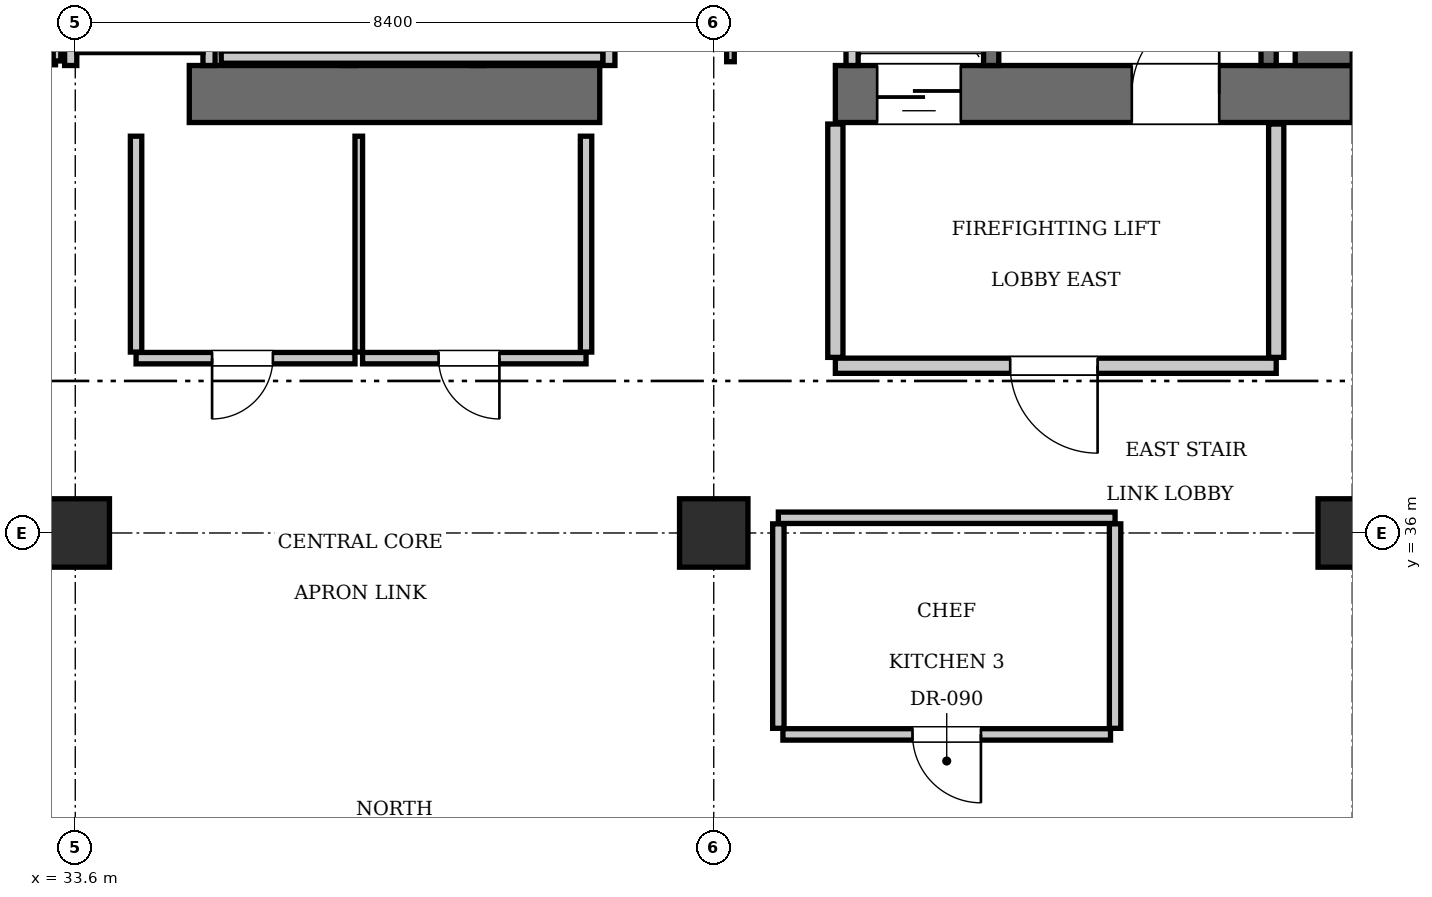
"""IFC4 building model, lengths in metres.
Left out: names, types, materials, properties, quantities, classifications, styles, units other than length and angle.
Written with IfcOpenShell. Run it as: python <this file> out.ifc"""

import sys

from ifc_helpers import new_model, si_unit, direction, frame, frame_2d, origin, origin_2d, place, context, subcontext, project, spatial, rectangle, extrude, element, fill, save


model = new_model("IFC4")
c1 = context("Model", 3, precision=1e-05, world=origin(), true_north=direction((0.0, 1.0)))
c2 = subcontext(c1, "Body", "Model", "MODEL_VIEW")
j1 = project(units=[si_unit("LENGTHUNIT", "METRE"), si_unit("PLANEANGLEUNIT", "RADIAN")], contexts=[c1])
p1 = place(None, origin())
s1 = spatial("IfcSite", under=j1, at=p1, CompositionType="ELEMENT")
p2 = place(p1, origin())
s2 = spatial("IfcBuilding", under=s1, at=p2, CompositionType="ELEMENT")
p3 = place(p2, frame((0.0, 0.0, 169.75)))
s3 = spatial("IfcBuildingStorey", under=s2, at=p3, CompositionType="ELEMENT", Elevation=169.75)
p4 = place(p3, frame((35.1, 41.775, 0.0), z_axis=(0.0, 0.0, 1.0), x_axis=(1.0, 0.0, 0.0)))
e1 = element("IfcWall", 1, at=p4, inside=s3, PredefinedType="SHEAR", context=c2, shape_type="SweptSolid", body=[
    extrude(rectangle(XDim=5.4, YDim=0.75, at=frame_2d((2.7, 0.0))), origin(), (0.0, 0.0, 1.0), 3.85),
])
p5 = place(p3, frame((43.6, 41.775, 0.0), z_axis=(0.0, 0.0, 1.0), x_axis=(1.0, 0.0, 0.0)))
e2 = element("IfcWall", 2, at=p5, inside=s3, PredefinedType="SHEAR", context=c2, shape_type="SweptSolid", body=[
    extrude(rectangle(XDim=6.8, YDim=0.75, at=frame_2d((3.4, 0.0))), origin(), (0.0, 0.0, 1.0), 3.85),
])
p6 = place(p5, frame((3.9, 0.0, 0.0)))
e3 = element("IfcOpeningElement", 3, at=p6, cuts=e2, PredefinedType="OPENING", context=c2, shape_type="SweptSolid", body=[
    extrude(rectangle(XDim=1.15, YDim=2.15, at=frame_2d((0.575, 1.075))), frame((0.0, 0.385, 0.0), z_axis=(0.0, -1.0, 0.0), x_axis=(1.0, 0.0, 0.0)), (0.0, 0.0, 1.0), 0.77),
])
p7 = place(p5, frame((0.55, 0.0, 0.0)))
e4 = element("IfcOpeningElement", 4, at=p7, cuts=e2, PredefinedType="OPENING", context=c2, shape_type="SweptSolid", body=[
    extrude(rectangle(XDim=1.1, YDim=2.2, at=frame_2d((0.55, 1.1))), frame((0.0, 0.385, 0.0), z_axis=(0.0, -1.0, 0.0), x_axis=(1.0, 0.0, 0.0)), (0.0, 0.0, 1.0), 0.77),
])
p8 = place(p3, frame((50.025, 42.15, 0.0), z_axis=(0.0, 0.0, 1.0), x_axis=(0.0, 1.0, 0.0)))
e5 = element("IfcWall", 5, at=p8, inside=s3, PredefinedType="SHEAR", context=c2, shape_type="SweptSolid", body=[
    extrude(rectangle(XDim=1.9, YDim=0.75, at=frame_2d((0.95, 0.0))), origin(), (0.0, 0.0, 1.0), 3.85),
])
for number, where, z_axis, x_axis in (
    (6, (33.6, 36.0, 0.0), (0.0, 0.0, 1.0), (1.0, 0.0, 0.0)),
    (7, (42.0, 36.0, 0.0), (0.0, 0.0, 1.0), (1.0, 0.0, 0.0)),
    (8, (50.4, 36.0, 0.0), (0.0, 0.0, 1.0), (1.0, 0.0, 0.0)),
):
    element("IfcColumn", number, at=place(p3, frame(where, z_axis=z_axis, x_axis=x_axis)), inside=s3, PredefinedType="COLUMN", context=c2, shape_type="SweptSolid", body=[
        extrude(rectangle(XDim=0.9, YDim=0.9, at=origin_2d()), origin(), (0.0, 0.0, 1.0), 3.85),
    ])
p9 = place(p3, frame((45.65, 42.15, 0.0), z_axis=(0.0, 0.0, 1.0), x_axis=(0.0, 1.0, 0.0)))
e9 = element("IfcWall", 9, at=p9, inside=s3, PredefinedType="SOLIDWALL", context=c2, shape_type="SweptSolid", body=[
    extrude(rectangle(XDim=9.0, YDim=0.2, at=frame_2d((4.5, 0.0))), origin(), (0.0, 0.0, 1.0), 3.61),
])
p10 = place(p3, frame((49.3, 42.15, 0.0), z_axis=(0.0, 0.0, 1.0), x_axis=(0.0, 1.0, 0.0)))
e10 = element("IfcWall", 10, at=p10, inside=s3, PredefinedType="SOLIDWALL", context=c2, shape_type="SweptSolid", body=[
    extrude(rectangle(XDim=1.87, YDim=0.2, at=frame_2d((0.935, 0.0))), origin(), (0.0, 0.0, 1.0), 3.61),
])
p11 = place(p3, frame((43.82, 42.15, 0.0), z_axis=(0.0, 0.0, 1.0), x_axis=(0.0, 1.0, 0.0)))
e11 = element("IfcWall", 11, at=p11, inside=s3, PredefinedType="SOLIDWALL", context=c2, shape_type="SweptSolid", body=[
    extrude(rectangle(XDim=2.59, YDim=0.16, at=frame_2d((1.295, 0.0))), origin(), (0.0, 0.0, 1.0), 3.61),
])
for number, where, z_axis, x_axis in (
    (12, (37.2, 42.15, 0.0), (0.0, 0.0, 1.0), (0.0, 1.0, 0.0)),
    (13, (38.9, 42.15, 0.0), (0.0, 0.0, 1.0), (0.0, 1.0, 0.0)),
    (14, (40.62, 42.15, 0.0), (0.0, 0.0, 1.0), (0.0, 1.0, 0.0)),
):
    element("IfcWall", number, at=place(p3, frame(where, z_axis=z_axis, x_axis=x_axis)), inside=s3, PredefinedType="SOLIDWALL", context=c2, shape_type="SweptSolid", body=[
        extrude(rectangle(XDim=2.2, YDim=0.16, at=frame_2d((1.1, 0.0))), origin(), (0.0, 0.0, 1.0), 3.61),
    ])
p12 = place(p3, frame((35.52, 42.26, 0.0), z_axis=(0.0, 0.0, 1.0), x_axis=(1.0, 0.0, 0.0)))
e15 = element("IfcWall", 15, at=p12, inside=s3, PredefinedType="SOLIDWALL", context=c2, shape_type="SweptSolid", body=[
    extrude(rectangle(XDim=5.02, YDim=0.16, at=frame_2d((2.51, 0.0))), origin(), (0.0, 0.0, 1.0), 3.61),
])
for number, where, z_axis, x_axis in (
    (16, (33.54, 42.15, 0.0), (0.0, 0.0, 1.0), (0.0, 1.0, 0.0)),
    (17, (35.36, 42.15, 0.0), (0.0, 0.0, 1.0), (0.0, 1.0, 0.0)),
):
    element("IfcWall", number, at=place(p3, frame(where, z_axis=z_axis, x_axis=x_axis)), inside=s3, PredefinedType="SOLIDWALL", context=c2, shape_type="SweptSolid", body=[
        extrude(rectangle(XDim=2.25, YDim=0.16, at=frame_2d((1.125, 0.0))), origin(), (0.0, 0.0, 1.0), 3.61),
    ])
p13 = place(p3, frame((33.62, 42.4, 0.0), z_axis=(0.0, 0.0, 1.0), x_axis=(1.0, 0.0, 0.0)))
e18 = element("IfcWall", 18, at=p13, inside=s3, PredefinedType="SOLIDWALL", context=c2, shape_type="SweptSolid", body=[
    extrude(rectangle(XDim=1.66, YDim=0.16, at=frame_2d((0.83, 0.0))), origin(), (0.0, 0.0, 1.0), 3.61),
])
p14 = place(p3, frame((43.6, 38.2, 0.0), z_axis=(0.0, 0.0, 1.0), x_axis=(1.0, 0.0, 0.0)))
e19 = element("IfcWall", 19, at=p14, inside=s3, PredefinedType="PARTITIONING", context=c2, shape_type="SweptSolid", body=[
    extrude(rectangle(XDim=5.8, YDim=0.2, at=frame_2d((2.9, 0.0))), origin(), (0.0, 0.0, 1.0), 3.61),
])
p15 = place(p14, frame((2.3, 0.0, 0.0)))
e20 = element("IfcOpeningElement", 20, at=p15, cuts=e19, PredefinedType="OPENING", context=c2, shape_type="SweptSolid", body=[
    extrude(rectangle(XDim=1.15, YDim=2.15, at=frame_2d((0.575, 1.075))), frame((0.0, 0.11, 0.0), z_axis=(0.0, -1.0, 0.0), x_axis=(1.0, 0.0, 0.0)), (0.0, 0.0, 1.0), 0.22),
])
for number, where, z_axis, x_axis in (
    (21, (43.6, 38.31, 0.0), (0.0, 0.0, 1.0), (0.0, 1.0, 0.0)),
    (22, (49.4, 38.31, 0.0), (0.0, 0.0, 1.0), (0.0, 1.0, 0.0)),
):
    element("IfcWall", number, at=place(p3, frame(where, z_axis=z_axis, x_axis=x_axis)), inside=s3, PredefinedType="PARTITIONING", context=c2, shape_type="SweptSolid", body=[
        extrude(rectangle(XDim=3.07, YDim=0.2, at=frame_2d((1.535, 0.0))), origin(), (0.0, 0.0, 1.0), 3.61),
    ])
p16 = place(p3, frame((32.02, 42.21, 0.0), z_axis=(0.0, 0.0, 1.0), x_axis=(1.0, 0.0, 0.0)))
e23 = element("IfcWall", 23, at=p16, inside=s3, PredefinedType="PARTITIONING", context=c2, shape_type="SweptSolid", body=[
    extrude(rectangle(XDim=1.32, YDim=0.1, at=frame_2d((0.66, 0.0))), origin(), (0.0, 0.0, 1.0), 3.61),
])
p17 = place(p16, frame((0.24, 0.0, 0.0)))
e24 = element("IfcOpeningElement", 24, at=p17, cuts=e23, PredefinedType="OPENING", context=c2, shape_type="SweptSolid", body=[
    extrude(rectangle(XDim=0.8, YDim=2.05, at=frame_2d((0.4, 1.025))), frame((0.0, 0.06, 0.0), z_axis=(0.0, -1.0, 0.0), x_axis=(1.0, 0.0, 0.0)), (0.0, 0.0, 1.0), 0.12),
])
p18 = place(p3, frame((33.36, 42.21, 0.0), z_axis=(0.0, 0.0, 1.0), x_axis=(0.0, 1.0, 0.0)))
e25 = element("IfcWall", 25, at=p18, inside=s3, PredefinedType="PARTITIONING", context=c2, shape_type="SweptSolid", body=[
    extrude(rectangle(XDim=2.73, YDim=0.1, at=frame_2d((1.365, 0.0))), origin(), (0.0, 0.0, 1.0), 3.61),
])
p19 = place(p3, frame((42.22, 42.2, 0.0), z_axis=(0.0, 0.0, 1.0), x_axis=(0.0, 1.0, 0.0)))
e26 = element("IfcWall", 26, at=p19, inside=s3, PredefinedType="PARTITIONING", context=c2, shape_type="SweptSolid", body=[
    extrude(rectangle(XDim=2.76, YDim=0.1, at=frame_2d((1.38, 0.0))), origin(), (0.0, 0.0, 1.0), 3.61),
])
p20 = place(p19, frame((0.65, 0.0, 0.0)))
e27 = element("IfcOpeningElement", 27, at=p20, cuts=e26, PredefinedType="OPENING", context=c2, shape_type="SweptSolid", body=[
    extrude(rectangle(XDim=0.8, YDim=2.05, at=frame_2d((0.4, 1.025))), frame((0.0, 0.06, 0.0), z_axis=(0.0, -1.0, 0.0), x_axis=(1.0, 0.0, 0.0)), (0.0, 0.0, 1.0), 0.12),
])
p21 = place(p3, frame((34.4, 38.3, 0.0), z_axis=(0.0, 0.0, 1.0), x_axis=(1.0, 0.0, 0.0)))
e28 = element("IfcWall", 28, at=p21, inside=s3, PredefinedType="PARTITIONING", context=c2, shape_type="SweptSolid", body=[
    extrude(rectangle(XDim=2.88, YDim=0.15, at=frame_2d((1.44, 0.0))), origin(), (0.0, 0.0, 1.0), 3.61),
])
p22 = place(p21, frame((1.0, 0.0, 0.0)))
e29 = element("IfcOpeningElement", 29, at=p22, cuts=e28, PredefinedType="OPENING", context=c2, shape_type="SweptSolid", body=[
    extrude(rectangle(XDim=0.8, YDim=2.05, at=frame_2d((0.4, 1.025))), frame((0.0, 0.085, 0.0), z_axis=(0.0, -1.0, 0.0), x_axis=(1.0, 0.0, 0.0)), (0.0, 0.0, 1.0), 0.17),
])
p23 = place(p3, frame((37.38, 38.3, 0.0), z_axis=(0.0, 0.0, 1.0), x_axis=(1.0, 0.0, 0.0)))
e30 = element("IfcWall", 30, at=p23, inside=s3, PredefinedType="PARTITIONING", context=c2, shape_type="SweptSolid", body=[
    extrude(rectangle(XDim=2.94, YDim=0.15, at=frame_2d((1.47, 0.0))), origin(), (0.0, 0.0, 1.0), 3.61),
])
p24 = place(p23, frame((1.0, 0.0, 0.0)))
e31 = element("IfcOpeningElement", 31, at=p24, cuts=e30, PredefinedType="OPENING", context=c2, shape_type="SweptSolid", body=[
    extrude(rectangle(XDim=0.8, YDim=2.05, at=frame_2d((0.4, 1.025))), frame((0.0, 0.085, 0.0), z_axis=(0.0, -1.0, 0.0), x_axis=(1.0, 0.0, 0.0)), (0.0, 0.0, 1.0), 0.17),
])
p25 = place(p3, frame((34.4, 38.38, 0.0), z_axis=(0.0, 0.0, 1.0), x_axis=(0.0, 1.0, 0.0)))
e32 = element("IfcWall", 32, at=p25, inside=s3, PredefinedType="PARTITIONING", context=c2, shape_type="SweptSolid", body=[
    extrude(rectangle(XDim=2.84, YDim=0.15, at=frame_2d((1.42, 0.0))), origin(), (0.0, 0.0, 1.0), 3.61),
])
p26 = place(p3, frame((37.33, 38.38, 0.0), z_axis=(0.0, 0.0, 1.0), x_axis=(0.0, 1.0, 0.0)))
e33 = element("IfcWall", 33, at=p26, inside=s3, PredefinedType="PARTITIONING", context=c2, shape_type="SweptSolid", body=[
    extrude(rectangle(XDim=2.84, YDim=0.1, at=frame_2d((1.42, 0.0))), origin(), (0.0, 0.0, 1.0), 3.61),
])
p27 = place(p3, frame((40.32, 38.38, 0.0), z_axis=(0.0, 0.0, 1.0), x_axis=(0.0, 1.0, 0.0)))
e34 = element("IfcWall", 34, at=p27, inside=s3, PredefinedType="PARTITIONING", context=c2, shape_type="SweptSolid", body=[
    extrude(rectangle(XDim=2.84, YDim=0.15, at=frame_2d((1.42, 0.0))), origin(), (0.0, 0.0, 1.0), 3.61),
])
p28 = place(p3, frame((42.85, 36.2, 0.0), z_axis=(0.0, 0.0, 1.0), x_axis=(1.0, 0.0, 0.0)))
e35 = element("IfcWall", 35, at=p28, inside=s3, PredefinedType="PARTITIONING", context=c2, shape_type="SweptSolid", body=[
    extrude(rectangle(XDim=4.43, YDim=0.15, at=frame_2d((2.215, 0.0))), origin(), (0.0, 0.0, 1.0), 3.61),
])
for number, where, z_axis, x_axis in (
    (36, (42.85, 33.43, 0.0), (0.0, 0.0, 1.0), (0.0, 1.0, 0.0)),
    (37, (47.28, 33.43, 0.0), (0.0, 0.0, 1.0), (0.0, 1.0, 0.0)),
):
    element("IfcWall", number, at=place(p3, frame(where, z_axis=z_axis, x_axis=x_axis)), inside=s3, PredefinedType="PARTITIONING", context=c2, shape_type="SweptSolid", body=[
        extrude(rectangle(XDim=2.69, YDim=0.15, at=frame_2d((1.345, 0.0))), origin(), (0.0, 0.0, 1.0), 3.61),
    ])
p29 = place(p3, frame((42.91, 33.35, 0.0), z_axis=(0.0, 0.0, 1.0), x_axis=(1.0, 0.0, 0.0)))
e38 = element("IfcWall", 38, at=p29, inside=s3, PredefinedType="PARTITIONING", context=c2, shape_type="SweptSolid", body=[
    extrude(rectangle(XDim=4.31, YDim=0.15, at=frame_2d((2.155, 0.0))), origin(), (0.0, 0.0, 1.0), 3.61),
])
p30 = place(p29, frame((1.705, 0.0, 0.0)))
e39 = element("IfcOpeningElement", 39, at=p30, cuts=e38, PredefinedType="OPENING", context=c2, shape_type="SweptSolid", body=[
    extrude(rectangle(XDim=0.9, YDim=2.1, at=frame_2d((0.45, 1.05))), frame((0.0, 0.085, 0.0), z_axis=(0.0, -1.0, 0.0), x_axis=(1.0, 0.0, 0.0)), (0.0, 0.0, 1.0), 0.17),
])
p31 = place(p6, origin())
e40 = element("IfcDoor", 40, at=p31, inside=s3, OperationType="SINGLE_SWING_RIGHT", PredefinedType="DOOR", context=c2, shape_type="SweptSolid", body=[
    extrude(rectangle(XDim=1.15, YDim=2.15, at=frame_2d((0.575, 1.075))), frame((0.0, 0.025, 0.0), z_axis=(0.0, -1.0, 0.0), x_axis=(1.0, 0.0, 0.0)), (0.0, 0.0, 1.0), 0.05),
])
fill(e3, e40)
p32 = place(p7, frame((1.1, 0.0, 0.0), z_axis=(0.0, 0.0, 1.0), x_axis=(-1.0, 0.0, 0.0)))
e41 = element("IfcDoor", 41, at=p32, inside=s3, OperationType="SLIDING_TO_LEFT", PredefinedType="DOOR", context=c2, shape_type="SweptSolid", body=[
    extrude(rectangle(XDim=1.1, YDim=2.2, at=frame_2d((0.55, 1.1))), frame((0.0, 0.025, 0.0), z_axis=(0.0, -1.0, 0.0), x_axis=(1.0, 0.0, 0.0)), (0.0, 0.0, 1.0), 0.05),
])
fill(e4, e41)
p33 = place(p15, frame((1.15, 0.0, 0.0), z_axis=(0.0, 0.0, 1.0), x_axis=(-1.0, 0.0, 0.0)))
e42 = element("IfcDoor", 42, at=p33, inside=s3, OperationType="SINGLE_SWING_LEFT", PredefinedType="DOOR", context=c2, shape_type="SweptSolid", body=[
    extrude(rectangle(XDim=1.15, YDim=2.15, at=frame_2d((0.575, 1.075))), frame((0.0, 0.025, 0.0), z_axis=(0.0, -1.0, 0.0), x_axis=(1.0, 0.0, 0.0)), (0.0, 0.0, 1.0), 0.05),
])
fill(e20, e42)
p34 = place(p22, frame((0.8, 0.0, 0.0), z_axis=(0.0, 0.0, 1.0), x_axis=(-1.0, 0.0, 0.0)))
e43 = element("IfcDoor", 43, at=p34, inside=s3, OperationType="SINGLE_SWING_RIGHT", PredefinedType="DOOR", context=c2, shape_type="SweptSolid", body=[
    extrude(rectangle(XDim=0.8, YDim=2.05, at=frame_2d((0.4, 1.025))), frame((0.0, 0.025, 0.0), z_axis=(0.0, -1.0, 0.0), x_axis=(1.0, 0.0, 0.0)), (0.0, 0.0, 1.0), 0.05),
])
fill(e29, e43)
p35 = place(p24, frame((0.8, 0.0, 0.0), z_axis=(0.0, 0.0, 1.0), x_axis=(-1.0, 0.0, 0.0)))
e44 = element("IfcDoor", 44, at=p35, inside=s3, OperationType="SINGLE_SWING_LEFT", PredefinedType="DOOR", context=c2, shape_type="SweptSolid", body=[
    extrude(rectangle(XDim=0.8, YDim=2.05, at=frame_2d((0.4, 1.025))), frame((0.0, 0.025, 0.0), z_axis=(0.0, -1.0, 0.0), x_axis=(1.0, 0.0, 0.0)), (0.0, 0.0, 1.0), 0.05),
])
fill(e31, e44)
p36 = place(p30, frame((0.9, 0.0, 0.0), z_axis=(0.0, 0.0, 1.0), x_axis=(-1.0, 0.0, 0.0)))
e45 = element("IfcDoor", 45, at=p36, inside=s3, OperationType="SINGLE_SWING_LEFT", PredefinedType="DOOR", context=c2, shape_type="SweptSolid", body=[
    extrude(rectangle(XDim=0.9, YDim=2.1, at=frame_2d((0.45, 1.05))), frame((0.0, 0.025, 0.0), z_axis=(0.0, -1.0, 0.0), x_axis=(1.0, 0.0, 0.0)), (0.0, 0.0, 1.0), 0.05),
])
fill(e39, e45)
save(model, sys.argv[1])
